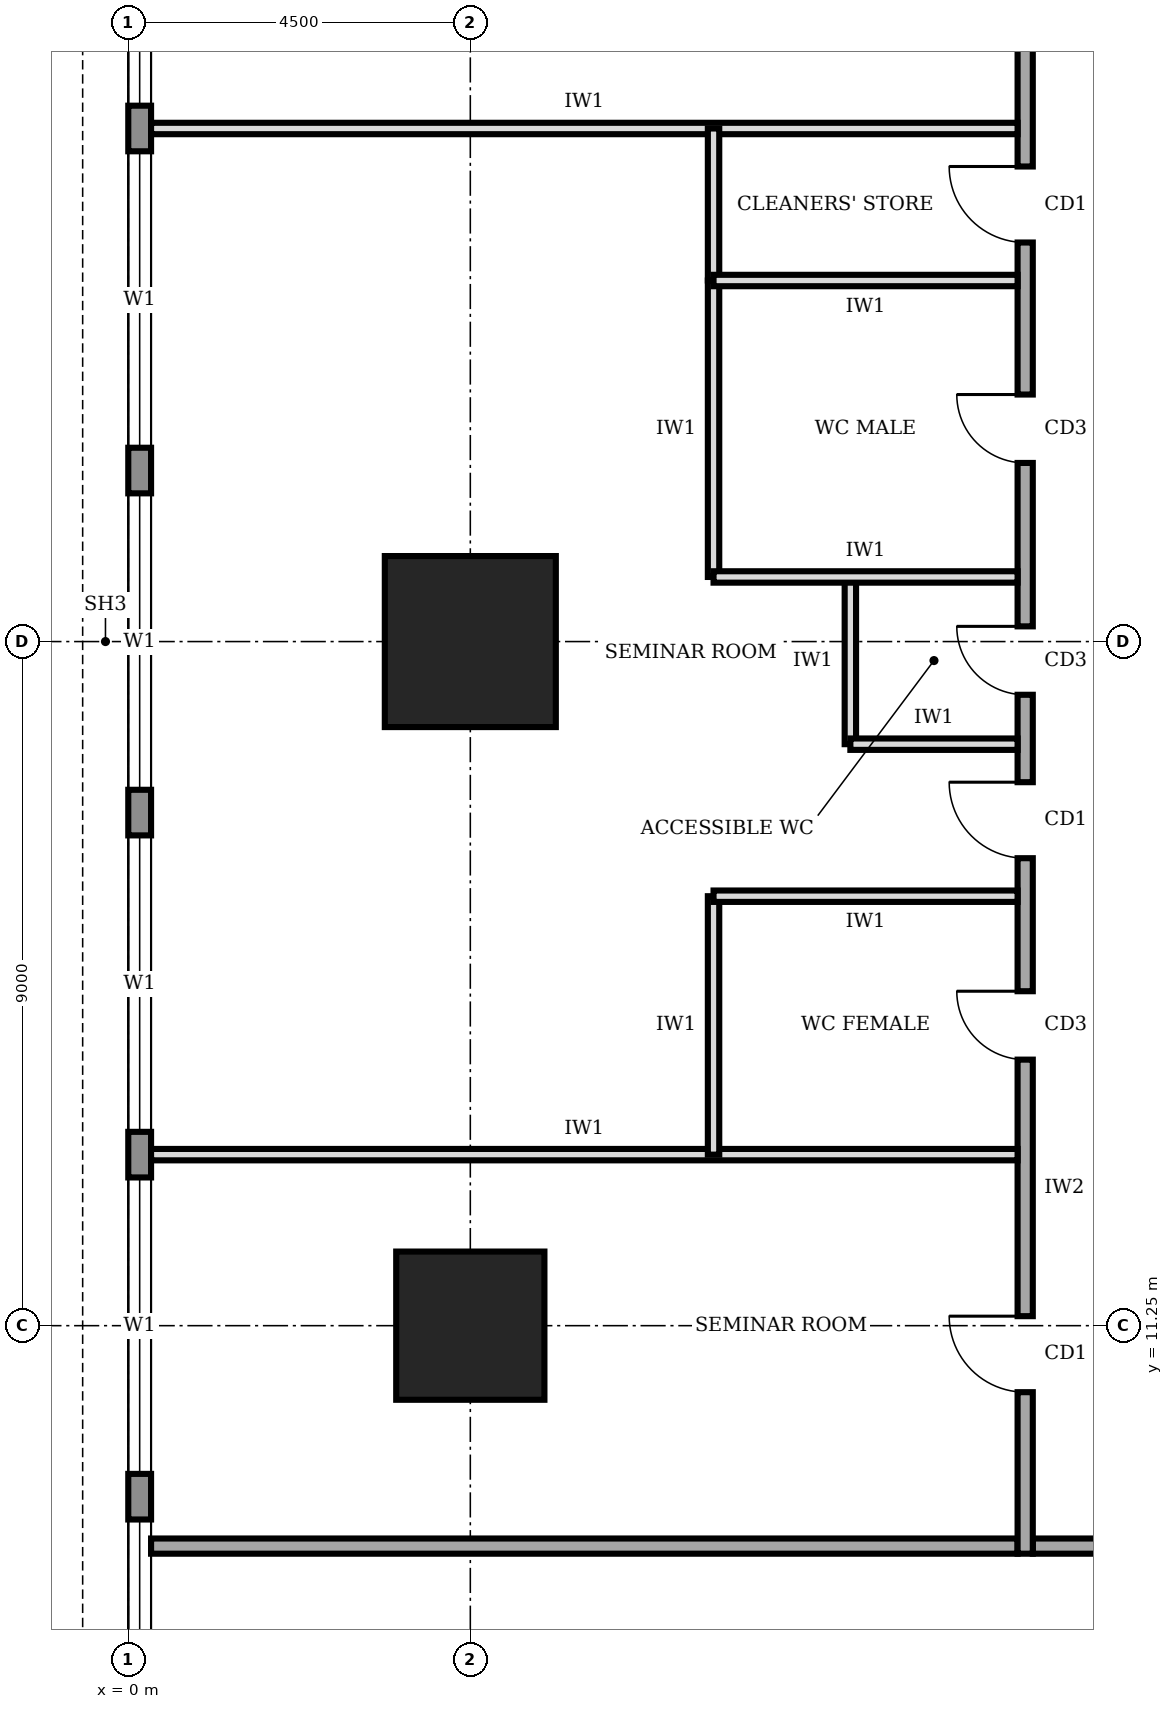
"""IFC4 building model, lengths in metres.
Left out: names, types, materials, properties, quantities, classifications, styles, units other than length and angle.
Written with IfcOpenShell. Run it as: python <this file> out.ifc"""

import sys

from ifc_helpers import new_model, si_unit, direction, frame, frame_2d, origin, origin_2d, place, context, subcontext, project, spatial, rectangle, extrude, element, fill, save


model = new_model("IFC4")
c1 = context("Model", 3, precision=1e-05, world=origin(), true_north=direction((0.0, 1.0)))
c2 = subcontext(c1, "Body", "Model", "MODEL_VIEW")
j1 = project(units=[si_unit("LENGTHUNIT", "METRE"), si_unit("PLANEANGLEUNIT", "RADIAN")], contexts=[c1])
p1 = place(None, origin())
s1 = spatial("IfcSite", under=j1, at=p1, CompositionType="ELEMENT")
p2 = place(p1, origin())
s2 = spatial("IfcBuilding", under=s1, at=p2, CompositionType="ELEMENT")
p3 = place(p2, frame((0.0, 0.0, 221.0)))
s3 = spatial("IfcBuildingStorey", under=s2, at=p3, CompositionType="ELEMENT", Elevation=221.0)
p4 = place(p3, frame((4.5, 11.25, 0.0), z_axis=(0.0, 0.0, 1.0), x_axis=(1.0, 0.0, 0.0)))
e1 = element("IfcColumn", 1, at=p4, inside=s3, PredefinedType="COLUMN", context=c2, shape_type="SweptSolid", body=[
    extrude(rectangle(XDim=1.95, YDim=1.95, at=origin_2d()), origin(), (0.0, 0.0, 1.0), 4.0),
])
p5 = place(p3, frame((4.5, 20.25, 0.0), z_axis=(0.0, 0.0, 1.0), x_axis=(1.0, 0.0, 0.0)))
e2 = element("IfcColumn", 2, at=p5, inside=s3, PredefinedType="COLUMN", context=c2, shape_type="SweptSolid", body=[
    extrude(rectangle(XDim=2.25, YDim=2.25, at=origin_2d()), origin(), (0.0, 0.0, 1.0), 4.0),
])
p6 = place(p3, frame((0.15, 35.98, 0.0), z_axis=(0.0, 0.0, 1.0), x_axis=(0.0, -1.0, 0.0)))
e3 = element("IfcWall", 3, at=p6, inside=s3, PredefinedType="STANDARD", context=c2, shape_type="SweptSolid", body=[
    extrude(rectangle(XDim=31.46, YDim=0.3, at=frame_2d((15.73, 0.0))), origin(), (0.0, 0.0, 1.0), 3.75),
])
p7 = place(p6, frame((27.28, 0.0, 0.9)))
e4 = element("IfcOpeningElement", 4, at=p7, cuts=e3, PredefinedType="OPENING", context=c2, shape_type="SweptSolid", body=[
    extrude(rectangle(XDim=3.9, YDim=2.2, at=frame_2d((1.95, 1.1))), frame((0.0, 0.16, 0.0), z_axis=(0.0, -1.0, 0.0), x_axis=(1.0, 0.0, 0.0)), (0.0, 0.0, 1.0), 0.32),
])
p8 = place(p6, frame((22.78, 0.0, 0.9)))
e5 = element("IfcOpeningElement", 5, at=p8, cuts=e3, PredefinedType="OPENING", context=c2, shape_type="SweptSolid", body=[
    extrude(rectangle(XDim=3.9, YDim=2.2, at=frame_2d((1.95, 1.1))), frame((0.0, 0.16, 0.0), z_axis=(0.0, -1.0, 0.0), x_axis=(1.0, 0.0, 0.0)), (0.0, 0.0, 1.0), 0.32),
])
p9 = place(p6, frame((18.28, 0.0, 0.9)))
e6 = element("IfcOpeningElement", 6, at=p9, cuts=e3, PredefinedType="OPENING", context=c2, shape_type="SweptSolid", body=[
    extrude(rectangle(XDim=3.9, YDim=2.2, at=frame_2d((1.95, 1.1))), frame((0.0, 0.16, 0.0), z_axis=(0.0, -1.0, 0.0), x_axis=(1.0, 0.0, 0.0)), (0.0, 0.0, 1.0), 0.32),
])
p10 = place(p6, frame((13.78, 0.0, 0.9)))
e7 = element("IfcOpeningElement", 7, at=p10, cuts=e3, PredefinedType="OPENING", context=c2, shape_type="SweptSolid", body=[
    extrude(rectangle(XDim=3.9, YDim=2.2, at=frame_2d((1.95, 1.1))), frame((0.0, 0.16, 0.0), z_axis=(0.0, -1.0, 0.0), x_axis=(1.0, 0.0, 0.0)), (0.0, 0.0, 1.0), 0.32),
])
p11 = place(p6, frame((9.28, 0.0, 0.9)))
e8 = element("IfcOpeningElement", 8, at=p11, cuts=e3, PredefinedType="OPENING", context=c2, shape_type="SweptSolid", body=[
    extrude(rectangle(XDim=3.9, YDim=2.2, at=frame_2d((1.95, 1.1))), frame((0.0, 0.16, 0.0), z_axis=(0.0, -1.0, 0.0), x_axis=(1.0, 0.0, 0.0)), (0.0, 0.0, 1.0), 0.32),
])
p12 = place(p6, frame((4.78, 0.0, 0.9)))
e9 = element("IfcOpeningElement", 9, at=p12, cuts=e3, PredefinedType="OPENING", context=c2, shape_type="SweptSolid", body=[
    extrude(rectangle(XDim=3.9, YDim=2.2, at=frame_2d((1.95, 1.1))), frame((0.0, 0.16, 0.0), z_axis=(0.0, -1.0, 0.0), x_axis=(1.0, 0.0, 0.0)), (0.0, 0.0, 1.0), 0.32),
])
p13 = place(p3, frame((11.9, 8.35, 0.0), z_axis=(0.0, 0.0, 1.0), x_axis=(1.0, 0.0, 0.0)))
e10 = element("IfcWall", 10, at=p13, inside=s3, PredefinedType="SOLIDWALL", context=c2, shape_type="SweptSolid", body=[
    extrude(rectangle(XDim=16.9, YDim=0.2, at=frame_2d((8.45, 0.0))), origin(), (0.0, 0.0, 1.0), 3.75),
])
p14 = place(p13, frame((2.05, 0.0, 0.0)))
e11 = element("IfcOpeningElement", 11, at=p14, cuts=e10, PredefinedType="OPENING", context=c2, shape_type="SweptSolid", body=[
    extrude(rectangle(XDim=1.8, YDim=2.1, at=frame_2d((0.9, 1.05))), frame((0.0, 0.11, 0.0), z_axis=(0.0, -1.0, 0.0), x_axis=(1.0, 0.0, 0.0)), (0.0, 0.0, 1.0), 0.22),
])
p15 = place(p13, frame((10.6, 0.0, 0.0)))
e12 = element("IfcOpeningElement", 12, at=p15, cuts=e10, PredefinedType="OPENING", context=c2, shape_type="SweptSolid", body=[
    extrude(rectangle(XDim=1.8, YDim=2.1, at=frame_2d((0.9, 1.05))), frame((0.0, 0.11, 0.0), z_axis=(0.0, -1.0, 0.0), x_axis=(1.0, 0.0, 0.0)), (0.0, 0.0, 1.0), 0.22),
])
p16 = place(p3, frame((11.8, 32.05, 0.0), z_axis=(0.0, 0.0, 1.0), x_axis=(0.0, -1.0, 0.0)))
e13 = element("IfcWall", 13, at=p16, inside=s3, PredefinedType="SOLIDWALL", context=c2, shape_type="SweptSolid", body=[
    extrude(rectangle(XDim=23.8, YDim=0.2, at=frame_2d((11.9, 0.0))), origin(), (0.0, 0.0, 1.0), 3.75),
])
p17 = place(p16, frame((20.675, 0.0, 0.0)))
e14 = element("IfcOpeningElement", 14, at=p17, cuts=e13, PredefinedType="OPENING", context=c2, shape_type="SweptSolid", body=[
    extrude(rectangle(XDim=1.0, YDim=2.1, at=frame_2d((0.5, 1.05))), frame((0.0, 0.11, 0.0), z_axis=(0.0, -1.0, 0.0), x_axis=(1.0, 0.0, 0.0)), (0.0, 0.0, 1.0), 0.22),
])
p18 = place(p16, frame((16.4, 0.0, 0.0)))
e15 = element("IfcOpeningElement", 15, at=p18, cuts=e13, PredefinedType="OPENING", context=c2, shape_type="SweptSolid", body=[
    extrude(rectangle(XDim=0.9, YDim=2.1, at=frame_2d((0.45, 1.05))), frame((0.0, 0.11, 0.0), z_axis=(0.0, -1.0, 0.0), x_axis=(1.0, 0.0, 0.0)), (0.0, 0.0, 1.0), 0.22),
])
p19 = place(p16, frame((11.6, 0.0, 0.0)))
e16 = element("IfcOpeningElement", 16, at=p19, cuts=e13, PredefinedType="OPENING", context=c2, shape_type="SweptSolid", body=[
    extrude(rectangle(XDim=0.9, YDim=2.1, at=frame_2d((0.45, 1.05))), frame((0.0, 0.11, 0.0), z_axis=(0.0, -1.0, 0.0), x_axis=(1.0, 0.0, 0.0)), (0.0, 0.0, 1.0), 0.22),
])
p20 = place(p16, frame((8.55, 0.0, 0.0)))
e17 = element("IfcOpeningElement", 17, at=p20, cuts=e13, PredefinedType="OPENING", context=c2, shape_type="SweptSolid", body=[
    extrude(rectangle(XDim=0.9, YDim=2.1, at=frame_2d((0.45, 1.05))), frame((0.0, 0.11, 0.0), z_axis=(0.0, -1.0, 0.0), x_axis=(1.0, 0.0, 0.0)), (0.0, 0.0, 1.0), 0.22),
])
p21 = place(p16, frame((5.55, 0.0, 0.0)))
e18 = element("IfcOpeningElement", 18, at=p21, cuts=e13, PredefinedType="OPENING", context=c2, shape_type="SweptSolid", body=[
    extrude(rectangle(XDim=1.0, YDim=2.1, at=frame_2d((0.5, 1.05))), frame((0.0, 0.11, 0.0), z_axis=(0.0, -1.0, 0.0), x_axis=(1.0, 0.0, 0.0)), (0.0, 0.0, 1.0), 0.22),
])
p22 = place(p16, frame((13.65, 0.0, 0.0)))
e19 = element("IfcOpeningElement", 19, at=p22, cuts=e13, PredefinedType="OPENING", context=c2, shape_type="SweptSolid", body=[
    extrude(rectangle(XDim=1.0, YDim=2.1, at=frame_2d((0.5, 1.05))), frame((0.0, 0.11, 0.0), z_axis=(0.0, -1.0, 0.0), x_axis=(1.0, 0.0, 0.0)), (0.0, 0.0, 1.0), 0.22),
])
p23 = place(p16, frame((1.925, 0.0, 0.0)))
e20 = element("IfcOpeningElement", 20, at=p23, cuts=e13, PredefinedType="OPENING", context=c2, shape_type="SweptSolid", body=[
    extrude(rectangle(XDim=1.0, YDim=2.1, at=frame_2d((0.5, 1.05))), frame((0.0, 0.11, 0.0), z_axis=(0.0, -1.0, 0.0), x_axis=(1.0, 0.0, 0.0)), (0.0, 0.0, 1.0), 0.22),
])
p24 = place(p3, frame((0.3, 8.35, 0.0), z_axis=(0.0, 0.0, 1.0), x_axis=(1.0, 0.0, 0.0)))
e21 = element("IfcWall", 21, at=p24, inside=s3, PredefinedType="SOLIDWALL", context=c2, shape_type="SweptSolid", body=[
    extrude(rectangle(XDim=11.4, YDim=0.2, at=frame_2d((5.7, 0.0))), origin(), (0.0, 0.0, 1.0), 3.75),
])
for number, where, z_axis, x_axis in (
    (22, (0.3, 13.5, 0.0), (0.0, 0.0, 1.0), (1.0, 0.0, 0.0)),
    (23, (0.3, 27.0, 0.0), (0.0, 0.0, 1.0), (1.0, 0.0, 0.0)),
):
    element("IfcWall", number, at=place(p3, frame(where, z_axis=z_axis, x_axis=x_axis)), inside=s3, PredefinedType="PARTITIONING", context=c2, shape_type="SweptSolid", body=[
        extrude(rectangle(XDim=11.4, YDim=0.15, at=frame_2d((5.7, 0.0))), origin(), (0.0, 0.0, 1.0), 3.75),
    ])
p25 = place(p3, frame((11.7, 16.9, 0.0), z_axis=(0.0, 0.0, 1.0), x_axis=(-1.0, 0.0, 0.0)))
e24 = element("IfcWall", 24, at=p25, inside=s3, PredefinedType="PARTITIONING", context=c2, shape_type="SweptSolid", body=[
    extrude(rectangle(XDim=4.0, YDim=0.15, at=frame_2d((2.0, 0.0))), origin(), (0.0, 0.0, 1.0), 3.75),
])
p26 = place(p3, frame((11.7, 18.9, 0.0), z_axis=(0.0, 0.0, 1.0), x_axis=(-1.0, 0.0, 0.0)))
e25 = element("IfcWall", 25, at=p26, inside=s3, PredefinedType="PARTITIONING", context=c2, shape_type="SweptSolid", body=[
    extrude(rectangle(XDim=2.2, YDim=0.15, at=frame_2d((1.1, 0.0))), origin(), (0.0, 0.0, 1.0), 3.75),
])
p27 = place(p3, frame((11.7, 21.1, 0.0), z_axis=(0.0, 0.0, 1.0), x_axis=(-1.0, 0.0, 0.0)))
e26 = element("IfcWall", 26, at=p27, inside=s3, PredefinedType="PARTITIONING", context=c2, shape_type="SweptSolid", body=[
    extrude(rectangle(XDim=4.0, YDim=0.15, at=frame_2d((2.0, 0.0))), origin(), (0.0, 0.0, 1.0), 2.85),
])
p28 = place(p3, frame((11.7, 25.0, 0.0), z_axis=(0.0, 0.0, 1.0), x_axis=(-1.0, 0.0, 0.0)))
e27 = element("IfcWall", 27, at=p28, inside=s3, PredefinedType="PARTITIONING", context=c2, shape_type="SweptSolid", body=[
    extrude(rectangle(XDim=4.0, YDim=0.15, at=frame_2d((2.0, 0.0))), origin(), (0.0, 0.0, 1.0), 3.75),
])
p29 = place(p3, frame((7.7, 13.5, 0.0), z_axis=(0.0, 0.0, 1.0), x_axis=(0.0, 1.0, 0.0)))
e28 = element("IfcWall", 28, at=p29, inside=s3, PredefinedType="PARTITIONING", context=c2, shape_type="SweptSolid", body=[
    extrude(rectangle(XDim=3.4, YDim=0.15, at=frame_2d((1.7, 0.0))), origin(), (0.0, 0.0, 1.0), 3.75),
])
p30 = place(p3, frame((9.5, 18.9, 0.0), z_axis=(0.0, 0.0, 1.0), x_axis=(0.0, 1.0, 0.0)))
e29 = element("IfcWall", 29, at=p30, inside=s3, PredefinedType="PARTITIONING", context=c2, shape_type="SweptSolid", body=[
    extrude(rectangle(XDim=2.2, YDim=0.15, at=frame_2d((1.1, 0.0))), origin(), (0.0, 0.0, 1.0), 3.75),
])
p31 = place(p3, frame((7.7, 21.1, 0.0), z_axis=(0.0, 0.0, 1.0), x_axis=(0.0, 1.0, 0.0)))
e30 = element("IfcWall", 30, at=p31, inside=s3, PredefinedType="PARTITIONING", context=c2, shape_type="SweptSolid", body=[
    extrude(rectangle(XDim=3.9, YDim=0.15, at=frame_2d((1.95, 0.0))), origin(), (0.0, 0.0, 1.0), 3.75),
])
p32 = place(p3, frame((7.7, 25.0, 0.0), z_axis=(0.0, 0.0, 1.0), x_axis=(0.0, 1.0, 0.0)))
e31 = element("IfcWall", 31, at=p32, inside=s3, PredefinedType="PARTITIONING", context=c2, shape_type="SweptSolid", body=[
    extrude(rectangle(XDim=2.0, YDim=0.15, at=frame_2d((1.0, 0.0))), origin(), (0.0, 0.0, 1.0), 3.75),
])
p33 = place(p7, origin())
e32 = element("IfcWindow", 32, at=p33, inside=s3, PartitioningType="SINGLE_PANEL", PredefinedType="WINDOW", context=c2, shape_type="SweptSolid", body=[
    extrude(rectangle(XDim=3.9, YDim=2.2, at=frame_2d((1.95, 1.1))), frame((0.0, 0.03, 0.0), z_axis=(0.0, -1.0, 0.0), x_axis=(1.0, 0.0, 0.0)), (0.0, 0.0, 1.0), 0.06),
])
fill(e4, e32)
p34 = place(p8, origin())
e33 = element("IfcWindow", 33, at=p34, inside=s3, PartitioningType="SINGLE_PANEL", PredefinedType="WINDOW", context=c2, shape_type="SweptSolid", body=[
    extrude(rectangle(XDim=3.9, YDim=2.2, at=frame_2d((1.95, 1.1))), frame((0.0, 0.03, 0.0), z_axis=(0.0, -1.0, 0.0), x_axis=(1.0, 0.0, 0.0)), (0.0, 0.0, 1.0), 0.06),
])
fill(e5, e33)
p35 = place(p9, origin())
e34 = element("IfcWindow", 34, at=p35, inside=s3, PartitioningType="SINGLE_PANEL", PredefinedType="WINDOW", context=c2, shape_type="SweptSolid", body=[
    extrude(rectangle(XDim=3.9, YDim=2.2, at=frame_2d((1.95, 1.1))), frame((0.0, 0.03, 0.0), z_axis=(0.0, -1.0, 0.0), x_axis=(1.0, 0.0, 0.0)), (0.0, 0.0, 1.0), 0.06),
])
fill(e6, e34)
p36 = place(p10, origin())
e35 = element("IfcWindow", 35, at=p36, inside=s3, PartitioningType="SINGLE_PANEL", PredefinedType="WINDOW", context=c2, shape_type="SweptSolid", body=[
    extrude(rectangle(XDim=3.9, YDim=2.2, at=frame_2d((1.95, 1.1))), frame((0.0, 0.03, 0.0), z_axis=(0.0, -1.0, 0.0), x_axis=(1.0, 0.0, 0.0)), (0.0, 0.0, 1.0), 0.06),
])
fill(e7, e35)
p37 = place(p11, origin())
e36 = element("IfcWindow", 36, at=p37, inside=s3, PartitioningType="SINGLE_PANEL", PredefinedType="WINDOW", context=c2, shape_type="SweptSolid", body=[
    extrude(rectangle(XDim=3.9, YDim=2.2, at=frame_2d((1.95, 1.1))), frame((0.0, 0.03, 0.0), z_axis=(0.0, -1.0, 0.0), x_axis=(1.0, 0.0, 0.0)), (0.0, 0.0, 1.0), 0.06),
])
fill(e8, e36)
p38 = place(p12, origin())
e37 = element("IfcWindow", 37, at=p38, inside=s3, PartitioningType="SINGLE_PANEL", PredefinedType="WINDOW", context=c2, shape_type="SweptSolid", body=[
    extrude(rectangle(XDim=3.9, YDim=2.2, at=frame_2d((1.95, 1.1))), frame((0.0, 0.03, 0.0), z_axis=(0.0, -1.0, 0.0), x_axis=(1.0, 0.0, 0.0)), (0.0, 0.0, 1.0), 0.06),
])
fill(e9, e37)
p39 = place(p17, frame((1.0, 0.0, 0.0), z_axis=(0.0, 0.0, 1.0), x_axis=(-1.0, 0.0, 0.0)))
e38 = element("IfcDoor", 38, at=p39, inside=s3, OperationType="SINGLE_SWING_RIGHT", PredefinedType="DOOR", context=c2, shape_type="SweptSolid", body=[
    extrude(rectangle(XDim=1.0, YDim=2.1, at=frame_2d((0.5, 1.05))), frame((0.0, 0.025, 0.0), z_axis=(0.0, -1.0, 0.0), x_axis=(1.0, 0.0, 0.0)), (0.0, 0.0, 1.0), 0.05),
])
fill(e14, e38)
p40 = place(p18, frame((0.9, 0.0, 0.0), z_axis=(0.0, 0.0, 1.0), x_axis=(-1.0, 0.0, 0.0)))
e39 = element("IfcDoor", 39, at=p40, inside=s3, OperationType="SINGLE_SWING_RIGHT", PredefinedType="DOOR", context=c2, shape_type="SweptSolid", body=[
    extrude(rectangle(XDim=0.9, YDim=2.1, at=frame_2d((0.45, 1.05))), frame((0.0, 0.025, 0.0), z_axis=(0.0, -1.0, 0.0), x_axis=(1.0, 0.0, 0.0)), (0.0, 0.0, 1.0), 0.05),
])
fill(e15, e39)
p41 = place(p19, frame((0.9, 0.0, 0.0), z_axis=(0.0, 0.0, 1.0), x_axis=(-1.0, 0.0, 0.0)))
e40 = element("IfcDoor", 40, at=p41, inside=s3, OperationType="SINGLE_SWING_RIGHT", PredefinedType="DOOR", context=c2, shape_type="SweptSolid", body=[
    extrude(rectangle(XDim=0.9, YDim=2.1, at=frame_2d((0.45, 1.05))), frame((0.0, 0.025, 0.0), z_axis=(0.0, -1.0, 0.0), x_axis=(1.0, 0.0, 0.0)), (0.0, 0.0, 1.0), 0.05),
])
fill(e16, e40)
p42 = place(p20, frame((0.9, 0.0, 0.0), z_axis=(0.0, 0.0, 1.0), x_axis=(-1.0, 0.0, 0.0)))
e41 = element("IfcDoor", 41, at=p42, inside=s3, OperationType="SINGLE_SWING_RIGHT", PredefinedType="DOOR", context=c2, shape_type="SweptSolid", body=[
    extrude(rectangle(XDim=0.9, YDim=2.1, at=frame_2d((0.45, 1.05))), frame((0.0, 0.025, 0.0), z_axis=(0.0, -1.0, 0.0), x_axis=(1.0, 0.0, 0.0)), (0.0, 0.0, 1.0), 0.05),
])
fill(e17, e41)
p43 = place(p21, frame((1.0, 0.0, 0.0), z_axis=(0.0, 0.0, 1.0), x_axis=(-1.0, 0.0, 0.0)))
e42 = element("IfcDoor", 42, at=p43, inside=s3, OperationType="SINGLE_SWING_RIGHT", PredefinedType="DOOR", context=c2, shape_type="SweptSolid", body=[
    extrude(rectangle(XDim=1.0, YDim=2.1, at=frame_2d((0.5, 1.05))), frame((0.0, 0.025, 0.0), z_axis=(0.0, -1.0, 0.0), x_axis=(1.0, 0.0, 0.0)), (0.0, 0.0, 1.0), 0.05),
])
fill(e18, e42)
p44 = place(p22, frame((1.0, 0.0, 0.0), z_axis=(0.0, 0.0, 1.0), x_axis=(-1.0, 0.0, 0.0)))
e43 = element("IfcDoor", 43, at=p44, inside=s3, OperationType="SINGLE_SWING_RIGHT", PredefinedType="DOOR", context=c2, shape_type="SweptSolid", body=[
    extrude(rectangle(XDim=1.0, YDim=2.1, at=frame_2d((0.5, 1.05))), frame((0.0, 0.025, 0.0), z_axis=(0.0, -1.0, 0.0), x_axis=(1.0, 0.0, 0.0)), (0.0, 0.0, 1.0), 0.05),
])
fill(e19, e43)
save(model, sys.argv[1])
